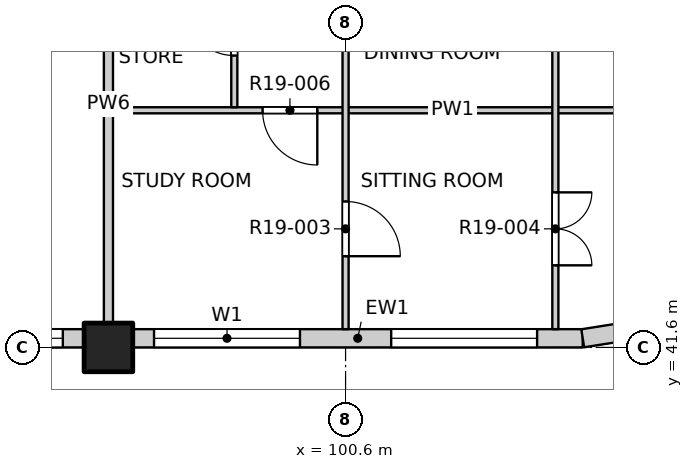
"""IFC4 building model, lengths in metres.
Left out: names, types, materials, properties, quantities, classifications, styles, units other than length and angle.
Written with IfcOpenShell. Run it as: python <this file> out.ifc"""

import sys

from ifc_helpers import new_model, si_unit, direction, frame, frame_2d, origin, origin_2d, place, context, subcontext, project, spatial, rectangle, extrude, element, fill, save


model = new_model("IFC4")
c1 = context("Model", 3, precision=1e-05, world=origin(), true_north=direction((0.0, 1.0)))
c2 = subcontext(c1, "Body", "Model", "MODEL_VIEW")
j1 = project(units=[si_unit("LENGTHUNIT", "METRE"), si_unit("PLANEANGLEUNIT", "RADIAN")], contexts=[c1])
p1 = place(None, origin())
s1 = spatial("IfcSite", under=j1, at=p1, CompositionType="ELEMENT")
p2 = place(p1, origin())
s2 = spatial("IfcBuilding", under=s1, at=p2, CompositionType="ELEMENT")
p3 = place(p2, frame((0.0, 0.0, 197.3)))
s3 = spatial("IfcBuildingStorey", under=s2, at=p3, CompositionType="ELEMENT", Elevation=197.3)
p4 = place(p3, frame((96.7, 41.6, -0.3), z_axis=(0.0, 0.0, 1.0), x_axis=(1.0, 0.0, 0.0)))
e1 = element("IfcColumn", 1, at=p4, inside=s3, PredefinedType="COLUMN", context=c2, shape_type="SweptSolid", body=[
    extrude(rectangle(XDim=0.8, YDim=0.8, at=origin_2d()), origin(), (0.0, 0.0, 1.0), 3.45),
])
p5 = place(p3, frame((89.3, 41.75, 0.0), z_axis=(0.0, 0.0, 1.0), x_axis=(1.0, 0.0, 0.0)))
e2 = element("IfcWall", 2, at=p5, inside=s3, PredefinedType="SOLIDWALL", context=c2, shape_type="SweptSolid", body=[
    extrude(rectangle(XDim=7.0, YDim=0.3, at=frame_2d((3.5, 0.0))), origin(), (0.0, 0.0, 1.0), 2.7),
])
p6 = place(p5, frame((0.35, 0.0, 0.9)))
e3 = element("IfcOpeningElement", 3, at=p6, cuts=e2, PredefinedType="OPENING", context=c2, shape_type="SweptSolid", body=[
    extrude(rectangle(XDim=2.4, YDim=1.8, at=frame_2d((1.2, 0.9))), frame((0.0, 0.16, 0.0), z_axis=(0.0, -1.0, 0.0), x_axis=(1.0, 0.0, 0.0)), (0.0, 0.0, 1.0), 0.32),
])
p7 = place(p5, frame((4.25, 0.0, 0.9)))
e4 = element("IfcOpeningElement", 4, at=p7, cuts=e2, PredefinedType="OPENING", context=c2, shape_type="SweptSolid", body=[
    extrude(rectangle(XDim=2.4, YDim=1.8, at=frame_2d((1.2, 0.9))), frame((0.0, 0.16, 0.0), z_axis=(0.0, -1.0, 0.0), x_axis=(1.0, 0.0, 0.0)), (0.0, 0.0, 1.0), 0.32),
])
p8 = place(p3, frame((97.1, 41.75, 0.0), z_axis=(0.0, 0.0, 1.0), x_axis=(1.0, 0.0, 0.0)))
e5 = element("IfcWall", 5, at=p8, inside=s3, PredefinedType="SOLIDWALL", context=c2, shape_type="SweptSolid", body=[
    extrude(rectangle(XDim=7.4, YDim=0.3, at=frame_2d((3.7, 0.0))), origin(), (0.0, 0.0, 1.0), 2.7),
])
p9 = place(p8, frame((0.35, 0.0, 0.9)))
e6 = element("IfcOpeningElement", 6, at=p9, cuts=e5, PredefinedType="OPENING", context=c2, shape_type="SweptSolid", body=[
    extrude(rectangle(XDim=2.4, YDim=1.8, at=frame_2d((1.2, 0.9))), frame((0.0, 0.16, 0.0), z_axis=(0.0, -1.0, 0.0), x_axis=(1.0, 0.0, 0.0)), (0.0, 0.0, 1.0), 0.32),
])
p10 = place(p8, frame((4.25, 0.0, 0.9)))
e7 = element("IfcOpeningElement", 7, at=p10, cuts=e5, PredefinedType="OPENING", context=c2, shape_type="SweptSolid", body=[
    extrude(rectangle(XDim=2.4, YDim=1.8, at=frame_2d((1.2, 0.9))), frame((0.0, 0.16, 0.0), z_axis=(0.0, -1.0, 0.0), x_axis=(1.0, 0.0, 0.0)), (0.0, 0.0, 1.0), 0.32),
])
p11 = place(p3, frame((104.5, 41.75, 0.0), z_axis=(0.0, 0.0, 1.0), x_axis=(0.987678452879, 0.156496880861, 0.0)))
e8 = element("IfcWall", 8, at=p11, inside=s3, PredefinedType="SOLIDWALL", context=c2, shape_type="SweptSolid", body=[
    extrude(rectangle(XDim=1.173, YDim=0.3, at=frame_2d((0.586, 0.0))), origin(), (0.0, 0.0, 1.0), 2.7),
])
p12 = place(p3, frame((96.625, 45.5, 0.0), z_axis=(0.0, 0.0, 1.0), x_axis=(1.0, 0.0, 0.0)))
e9 = element("IfcWall", 9, at=p12, inside=s3, PredefinedType="PARTITIONING", context=c2, shape_type="SweptSolid", body=[
    extrude(rectangle(XDim=11.475, YDim=0.1, at=frame_2d((5.738, 0.0))), origin(), (0.0, 0.0, 1.0), 3.15),
])
p13 = place(p12, frame((2.61, 0.0, 0.0)))
e10 = element("IfcOpeningElement", 10, at=p13, cuts=e9, PredefinedType="OPENING", context=c2, shape_type="SweptSolid", body=[
    extrude(rectangle(XDim=0.9, YDim=2.1, at=frame_2d((0.45, 1.05))), frame((0.0, 0.06, 0.0), z_axis=(0.0, -1.0, 0.0), x_axis=(1.0, 0.0, 0.0)), (0.0, 0.0, 1.0), 0.12),
])
p14 = place(p3, frame((96.7, 41.9, 0.0), z_axis=(0.0, 0.0, 1.0), x_axis=(0.0, 1.0, 0.0)))
e11 = element("IfcWall", 11, at=p14, inside=s3, PredefinedType="PARTITIONING", context=c2, shape_type="SweptSolid", body=[
    extrude(rectangle(XDim=7.4, YDim=0.15, at=frame_2d((3.7, 0.0))), origin(), (0.0, 0.0, 1.0), 3.15),
])
p15 = place(p3, frame((98.77, 45.55, 0.0), z_axis=(0.0, 0.0, 1.0), x_axis=(0.0, 1.0, 0.0)))
e12 = element("IfcWall", 12, at=p15, inside=s3, PredefinedType="PARTITIONING", context=c2, shape_type="SweptSolid", body=[
    extrude(rectangle(XDim=9.15, YDim=0.1, at=frame_2d((4.575, 0.0))), origin(), (0.0, 0.0, 1.0), 3.15),
])
p16 = place(p15, frame((0.85, 0.0, 0.0)))
e13 = element("IfcOpeningElement", 13, at=p16, cuts=e12, PredefinedType="OPENING", context=c2, shape_type="SweptSolid", body=[
    extrude(rectangle(XDim=0.8, YDim=2.1, at=frame_2d((0.4, 1.05))), frame((0.0, 0.06, 0.0), z_axis=(0.0, -1.0, 0.0), x_axis=(1.0, 0.0, 0.0)), (0.0, 0.0, 1.0), 0.12),
])
p17 = place(p15, frame((3.375, 0.0, 0.0)))
e14 = element("IfcOpeningElement", 14, at=p17, cuts=e12, PredefinedType="OPENING", context=c2, shape_type="SweptSolid", body=[
    extrude(rectangle(XDim=0.8, YDim=2.1, at=frame_2d((0.4, 1.05))), frame((0.0, 0.06, 0.0), z_axis=(0.0, -1.0, 0.0), x_axis=(1.0, 0.0, 0.0)), (0.0, 0.0, 1.0), 0.12),
])
p18 = place(p15, frame((5.75, 0.0, 0.0)))
e15 = element("IfcOpeningElement", 15, at=p18, cuts=e12, PredefinedType="OPENING", context=c2, shape_type="SweptSolid", body=[
    extrude(rectangle(XDim=0.9, YDim=2.1, at=frame_2d((0.45, 1.05))), frame((0.0, 0.06, 0.0), z_axis=(0.0, -1.0, 0.0), x_axis=(1.0, 0.0, 0.0)), (0.0, 0.0, 1.0), 0.12),
])
p19 = place(p15, frame((7.85, 0.0, 0.0)))
e16 = element("IfcOpeningElement", 16, at=p19, cuts=e12, PredefinedType="OPENING", context=c2, shape_type="SweptSolid", body=[
    extrude(rectangle(XDim=0.9, YDim=2.1, at=frame_2d((0.45, 1.05))), frame((0.0, 0.06, 0.0), z_axis=(0.0, -1.0, 0.0), x_axis=(1.0, 0.0, 0.0)), (0.0, 0.0, 1.0), 0.12),
])
p20 = place(p3, frame((100.6, 41.9, 0.0), z_axis=(0.0, 0.0, 1.0), x_axis=(0.0, 1.0, 0.0)))
e17 = element("IfcWall", 17, at=p20, inside=s3, PredefinedType="PARTITIONING", context=c2, shape_type="SweptSolid", body=[
    extrude(rectangle(XDim=46.2, YDim=0.1, at=frame_2d((23.1, 0.0))), origin(), (0.0, 0.0, 1.0), 3.15),
])
p21 = place(p20, frame((1.2, 0.0, 0.0)))
e18 = element("IfcOpeningElement", 18, at=p21, cuts=e17, PredefinedType="OPENING", context=c2, shape_type="SweptSolid", body=[
    extrude(rectangle(XDim=0.9, YDim=2.1, at=frame_2d((0.45, 1.05))), frame((0.0, 0.06, 0.0), z_axis=(0.0, -1.0, 0.0), x_axis=(1.0, 0.0, 0.0)), (0.0, 0.0, 1.0), 0.12),
])
p22 = place(p20, frame((5.1, 0.0, 0.0)))
e19 = element("IfcOpeningElement", 19, at=p22, cuts=e17, PredefinedType="OPENING", context=c2, shape_type="SweptSolid", body=[
    extrude(rectangle(XDim=0.9, YDim=2.1, at=frame_2d((0.45, 1.05))), frame((0.0, 0.06, 0.0), z_axis=(0.0, -1.0, 0.0), x_axis=(1.0, 0.0, 0.0)), (0.0, 0.0, 1.0), 0.12),
])
p23 = place(p20, frame((9.975, 0.0, 0.0)))
e20 = element("IfcOpeningElement", 20, at=p23, cuts=e17, PredefinedType="OPENING", context=c2, shape_type="SweptSolid", body=[
    extrude(rectangle(XDim=0.9, YDim=2.1, at=frame_2d((0.45, 1.05))), frame((0.0, 0.06, 0.0), z_axis=(0.0, -1.0, 0.0), x_axis=(1.0, 0.0, 0.0)), (0.0, 0.0, 1.0), 0.12),
])
p24 = place(p20, frame((12.9, 0.0, 0.0)))
e21 = element("IfcOpeningElement", 21, at=p24, cuts=e17, PredefinedType="OPENING", context=c2, shape_type="SweptSolid", body=[
    extrude(rectangle(XDim=0.9, YDim=2.1, at=frame_2d((0.45, 1.05))), frame((0.0, 0.06, 0.0), z_axis=(0.0, -1.0, 0.0), x_axis=(1.0, 0.0, 0.0)), (0.0, 0.0, 1.0), 0.12),
])
p25 = place(p20, frame((17.775, 0.0, 0.0)))
e22 = element("IfcOpeningElement", 22, at=p25, cuts=e17, PredefinedType="OPENING", context=c2, shape_type="SweptSolid", body=[
    extrude(rectangle(XDim=0.9, YDim=2.1, at=frame_2d((0.45, 1.05))), frame((0.0, 0.06, 0.0), z_axis=(0.0, -1.0, 0.0), x_axis=(1.0, 0.0, 0.0)), (0.0, 0.0, 1.0), 0.12),
])
p26 = place(p20, frame((20.7, 0.0, 0.0)))
e23 = element("IfcOpeningElement", 23, at=p26, cuts=e17, PredefinedType="OPENING", context=c2, shape_type="SweptSolid", body=[
    extrude(rectangle(XDim=0.9, YDim=2.1, at=frame_2d((0.45, 1.05))), frame((0.0, 0.06, 0.0), z_axis=(0.0, -1.0, 0.0), x_axis=(1.0, 0.0, 0.0)), (0.0, 0.0, 1.0), 0.12),
])
p27 = place(p20, frame((25.575, 0.0, 0.0)))
e24 = element("IfcOpeningElement", 24, at=p27, cuts=e17, PredefinedType="OPENING", context=c2, shape_type="SweptSolid", body=[
    extrude(rectangle(XDim=0.9, YDim=2.1, at=frame_2d((0.45, 1.05))), frame((0.0, 0.06, 0.0), z_axis=(0.0, -1.0, 0.0), x_axis=(1.0, 0.0, 0.0)), (0.0, 0.0, 1.0), 0.12),
])
p28 = place(p20, frame((28.5, 0.0, 0.0)))
e25 = element("IfcOpeningElement", 25, at=p28, cuts=e17, PredefinedType="OPENING", context=c2, shape_type="SweptSolid", body=[
    extrude(rectangle(XDim=0.9, YDim=2.1, at=frame_2d((0.45, 1.05))), frame((0.0, 0.06, 0.0), z_axis=(0.0, -1.0, 0.0), x_axis=(1.0, 0.0, 0.0)), (0.0, 0.0, 1.0), 0.12),
])
p29 = place(p20, frame((33.375, 0.0, 0.0)))
e26 = element("IfcOpeningElement", 26, at=p29, cuts=e17, PredefinedType="OPENING", context=c2, shape_type="SweptSolid", body=[
    extrude(rectangle(XDim=0.9, YDim=2.1, at=frame_2d((0.45, 1.05))), frame((0.0, 0.06, 0.0), z_axis=(0.0, -1.0, 0.0), x_axis=(1.0, 0.0, 0.0)), (0.0, 0.0, 1.0), 0.12),
])
p30 = place(p20, frame((37.225, 0.0, 0.0)))
e27 = element("IfcOpeningElement", 27, at=p30, cuts=e17, PredefinedType="OPENING", context=c2, shape_type="SweptSolid", body=[
    extrude(rectangle(XDim=0.9, YDim=2.1, at=frame_2d((0.45, 1.05))), frame((0.0, 0.06, 0.0), z_axis=(0.0, -1.0, 0.0), x_axis=(1.0, 0.0, 0.0)), (0.0, 0.0, 1.0), 0.12),
])
p31 = place(p20, frame((41.175, 0.0, 0.0)))
e28 = element("IfcOpeningElement", 28, at=p31, cuts=e17, PredefinedType="OPENING", context=c2, shape_type="SweptSolid", body=[
    extrude(rectangle(XDim=0.9, YDim=2.1, at=frame_2d((0.45, 1.05))), frame((0.0, 0.06, 0.0), z_axis=(0.0, -1.0, 0.0), x_axis=(1.0, 0.0, 0.0)), (0.0, 0.0, 1.0), 0.12),
])
p32 = place(p20, frame((44.1, 0.0, 0.0)))
e29 = element("IfcOpeningElement", 29, at=p32, cuts=e17, PredefinedType="OPENING", context=c2, shape_type="SweptSolid", body=[
    extrude(rectangle(XDim=0.9, YDim=2.1, at=frame_2d((0.45, 1.05))), frame((0.0, 0.06, 0.0), z_axis=(0.0, -1.0, 0.0), x_axis=(1.0, 0.0, 0.0)), (0.0, 0.0, 1.0), 0.12),
])
p33 = place(p3, frame((104.05, 41.9, 0.0), z_axis=(0.0, 0.0, 1.0), x_axis=(0.0, 1.0, 0.0)))
e30 = element("IfcWall", 30, at=p33, inside=s3, PredefinedType="PARTITIONING", context=c2, shape_type="SweptSolid", body=[
    extrude(rectangle(XDim=26.9, YDim=0.1, at=frame_2d((13.45, 0.0))), origin(), (0.0, 0.0, 1.0), 3.15),
])
p34 = place(p33, frame((1.05, 0.0, 0.0)))
e31 = element("IfcOpeningElement", 31, at=p34, cuts=e30, PredefinedType="OPENING", context=c2, shape_type="SweptSolid", body=[
    extrude(rectangle(XDim=1.2, YDim=2.1, at=frame_2d((0.6, 1.05))), frame((0.0, 0.06, 0.0), z_axis=(0.0, -1.0, 0.0), x_axis=(1.0, 0.0, 0.0)), (0.0, 0.0, 1.0), 0.12),
])
p35 = place(p33, frame((4.95, 0.0, 0.0)))
e32 = element("IfcOpeningElement", 32, at=p35, cuts=e30, PredefinedType="OPENING", context=c2, shape_type="SweptSolid", body=[
    extrude(rectangle(XDim=1.2, YDim=2.1, at=frame_2d((0.6, 1.05))), frame((0.0, 0.06, 0.0), z_axis=(0.0, -1.0, 0.0), x_axis=(1.0, 0.0, 0.0)), (0.0, 0.0, 1.0), 0.12),
])
p36 = place(p33, frame((8.025, 0.0, 0.0)))
e33 = element("IfcOpeningElement", 33, at=p36, cuts=e30, PredefinedType="OPENING", context=c2, shape_type="SweptSolid", body=[
    extrude(rectangle(XDim=0.9, YDim=2.1, at=frame_2d((0.45, 1.05))), frame((0.0, 0.06, 0.0), z_axis=(0.0, -1.0, 0.0), x_axis=(1.0, 0.0, 0.0)), (0.0, 0.0, 1.0), 0.12),
])
p37 = place(p33, frame((9.975, 0.0, 0.0)))
e34 = element("IfcOpeningElement", 34, at=p37, cuts=e30, PredefinedType="OPENING", context=c2, shape_type="SweptSolid", body=[
    extrude(rectangle(XDim=0.9, YDim=2.1, at=frame_2d((0.45, 1.05))), frame((0.0, 0.06, 0.0), z_axis=(0.0, -1.0, 0.0), x_axis=(1.0, 0.0, 0.0)), (0.0, 0.0, 1.0), 0.12),
])
p38 = place(p33, frame((12.75, 0.0, 0.0)))
e35 = element("IfcOpeningElement", 35, at=p38, cuts=e30, PredefinedType="OPENING", context=c2, shape_type="SweptSolid", body=[
    extrude(rectangle(XDim=1.2, YDim=2.1, at=frame_2d((0.6, 1.05))), frame((0.0, 0.06, 0.0), z_axis=(0.0, -1.0, 0.0), x_axis=(1.0, 0.0, 0.0)), (0.0, 0.0, 1.0), 0.12),
])
p39 = place(p33, frame((15.825, 0.0, 0.0)))
e36 = element("IfcOpeningElement", 36, at=p39, cuts=e30, PredefinedType="OPENING", context=c2, shape_type="SweptSolid", body=[
    extrude(rectangle(XDim=0.9, YDim=2.1, at=frame_2d((0.45, 1.05))), frame((0.0, 0.06, 0.0), z_axis=(0.0, -1.0, 0.0), x_axis=(1.0, 0.0, 0.0)), (0.0, 0.0, 1.0), 0.12),
])
p40 = place(p33, frame((17.775, 0.0, 0.0)))
e37 = element("IfcOpeningElement", 37, at=p40, cuts=e30, PredefinedType="OPENING", context=c2, shape_type="SweptSolid", body=[
    extrude(rectangle(XDim=0.9, YDim=2.1, at=frame_2d((0.45, 1.05))), frame((0.0, 0.06, 0.0), z_axis=(0.0, -1.0, 0.0), x_axis=(1.0, 0.0, 0.0)), (0.0, 0.0, 1.0), 0.12),
])
p41 = place(p33, frame((20.55, 0.0, 0.0)))
e38 = element("IfcOpeningElement", 38, at=p41, cuts=e30, PredefinedType="OPENING", context=c2, shape_type="SweptSolid", body=[
    extrude(rectangle(XDim=1.2, YDim=2.1, at=frame_2d((0.6, 1.05))), frame((0.0, 0.06, 0.0), z_axis=(0.0, -1.0, 0.0), x_axis=(1.0, 0.0, 0.0)), (0.0, 0.0, 1.0), 0.12),
])
p42 = place(p33, frame((23.625, 0.0, 0.0)))
e39 = element("IfcOpeningElement", 39, at=p42, cuts=e30, PredefinedType="OPENING", context=c2, shape_type="SweptSolid", body=[
    extrude(rectangle(XDim=0.9, YDim=2.1, at=frame_2d((0.45, 1.05))), frame((0.0, 0.06, 0.0), z_axis=(0.0, -1.0, 0.0), x_axis=(1.0, 0.0, 0.0)), (0.0, 0.0, 1.0), 0.12),
])
p43 = place(p33, frame((25.575, 0.0, 0.0)))
e40 = element("IfcOpeningElement", 40, at=p43, cuts=e30, PredefinedType="OPENING", context=c2, shape_type="SweptSolid", body=[
    extrude(rectangle(XDim=0.9, YDim=2.1, at=frame_2d((0.45, 1.05))), frame((0.0, 0.06, 0.0), z_axis=(0.0, -1.0, 0.0), x_axis=(1.0, 0.0, 0.0)), (0.0, 0.0, 1.0), 0.12),
])
p44 = place(p7, origin())
e41 = element("IfcWindow", 41, at=p44, inside=s3, PartitioningType="DOUBLE_PANEL_VERTICAL", PredefinedType="WINDOW", context=c2, shape_type="SweptSolid", body=[
    extrude(rectangle(XDim=2.4, YDim=1.8, at=frame_2d((1.2, 0.9))), frame((0.0, 0.03, 0.0), z_axis=(0.0, -1.0, 0.0), x_axis=(1.0, 0.0, 0.0)), (0.0, 0.0, 1.0), 0.06),
])
fill(e4, e41)
p45 = place(p9, origin())
e42 = element("IfcWindow", 42, at=p45, inside=s3, PartitioningType="DOUBLE_PANEL_VERTICAL", PredefinedType="WINDOW", context=c2, shape_type="SweptSolid", body=[
    extrude(rectangle(XDim=2.4, YDim=1.8, at=frame_2d((1.2, 0.9))), frame((0.0, 0.03, 0.0), z_axis=(0.0, -1.0, 0.0), x_axis=(1.0, 0.0, 0.0)), (0.0, 0.0, 1.0), 0.06),
])
fill(e6, e42)
p46 = place(p10, origin())
e43 = element("IfcWindow", 43, at=p46, inside=s3, PartitioningType="DOUBLE_PANEL_VERTICAL", PredefinedType="WINDOW", context=c2, shape_type="SweptSolid", body=[
    extrude(rectangle(XDim=2.4, YDim=1.8, at=frame_2d((1.2, 0.9))), frame((0.0, 0.03, 0.0), z_axis=(0.0, -1.0, 0.0), x_axis=(1.0, 0.0, 0.0)), (0.0, 0.0, 1.0), 0.06),
])
fill(e7, e43)
p47 = place(p21, origin())
e44 = element("IfcDoor", 44, at=p47, inside=s3, OperationType="SINGLE_SWING_RIGHT", PredefinedType="DOOR", context=c2, shape_type="SweptSolid", body=[
    extrude(rectangle(XDim=0.9, YDim=2.1, at=frame_2d((0.45, 1.05))), frame((0.0, 0.025, 0.0), z_axis=(0.0, -1.0, 0.0), x_axis=(1.0, 0.0, 0.0)), (0.0, 0.0, 1.0), 0.05),
])
fill(e18, e44)
p48 = place(p34, origin())
e45 = element("IfcDoor", 45, at=p48, inside=s3, OperationType="DOUBLE_DOOR_SINGLE_SWING", PredefinedType="DOOR", context=c2, shape_type="SweptSolid", body=[
    extrude(rectangle(XDim=1.2, YDim=2.1, at=frame_2d((0.6, 1.05))), frame((0.0, 0.025, 0.0), z_axis=(0.0, -1.0, 0.0), x_axis=(1.0, 0.0, 0.0)), (0.0, 0.0, 1.0), 0.05),
])
fill(e31, e45)
p49 = place(p13, origin())
e46 = element("IfcDoor", 46, at=p49, inside=s3, OperationType="SINGLE_SWING_LEFT", PredefinedType="DOOR", context=c2, shape_type="SweptSolid", body=[
    extrude(rectangle(XDim=0.9, YDim=2.1, at=frame_2d((0.45, 1.05))), frame((0.0, 0.025, 0.0), z_axis=(0.0, -1.0, 0.0), x_axis=(1.0, 0.0, 0.0)), (0.0, 0.0, 1.0), 0.05),
])
fill(e10, e46)
p50 = place(p16, origin())
e47 = element("IfcDoor", 47, at=p50, inside=s3, OperationType="SINGLE_SWING_RIGHT", PredefinedType="DOOR", context=c2, shape_type="SweptSolid", body=[
    extrude(rectangle(XDim=0.8, YDim=2.1, at=frame_2d((0.4, 1.05))), frame((0.0, 0.025, 0.0), z_axis=(0.0, -1.0, 0.0), x_axis=(1.0, 0.0, 0.0)), (0.0, 0.0, 1.0), 0.05),
])
fill(e13, e47)
save(model, sys.argv[1])
